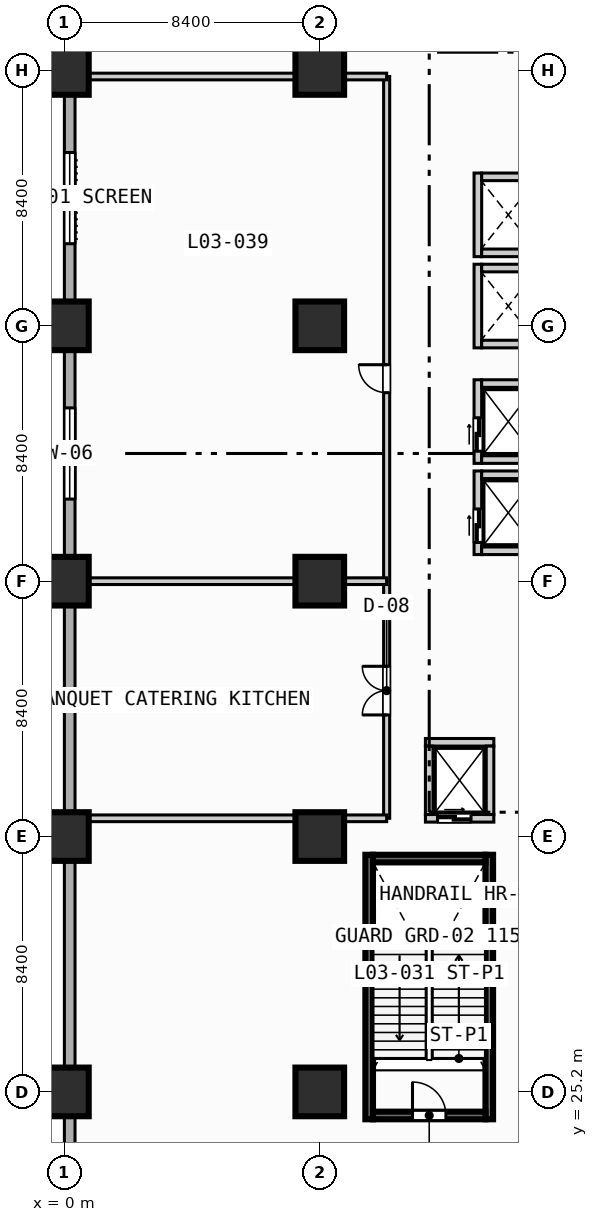
"""IFC4 building model, lengths in metres.
Left out: names, types, materials, properties, quantities, classifications, styles, units other than length and angle.
Written with IfcOpenShell. Run it as: python <this file> out.ifc"""

import sys

from ifc_helpers import new_model, si_unit, direction, frame, frame_2d, origin, origin_2d, place, context, subcontext, project, spatial, rectangle, extrude, element, fill, save


model = new_model("IFC4")
c1 = context("Model", 3, precision=1e-05, world=origin(), true_north=direction((0.0, 1.0)))
c2 = subcontext(c1, "Body", "Model", "MODEL_VIEW")
j1 = project(units=[si_unit("LENGTHUNIT", "METRE"), si_unit("PLANEANGLEUNIT", "RADIAN")], contexts=[c1])
p1 = place(None, origin())
s1 = spatial("IfcSite", under=j1, at=p1, CompositionType="ELEMENT")
p2 = place(p1, origin())
s2 = spatial("IfcBuilding", under=s1, at=p2, CompositionType="ELEMENT")
p3 = place(p2, frame((0.0, 0.0, 15.6)))
s3 = spatial("IfcBuildingStorey", under=s2, at=p3, CompositionType="ELEMENT", Elevation=15.6)
for number, where, z_axis, x_axis in (
    (1, (10.025, 24.3, 0.0), (0.0, 0.0, 1.0), (0.0, 1.0, 0.0)),
    (2, (13.975, 24.3, 0.0), (0.0, 0.0, 1.0), (0.0, 1.0, 0.0)),
):
    element("IfcWall", number, at=place(p3, frame(where, z_axis=z_axis, x_axis=x_axis)), inside=s3, PredefinedType="SOLIDWALL", context=c2, shape_type="SweptSolid", body=[
        extrude(rectangle(XDim=8.7, YDim=0.25, at=frame_2d((4.35, 0.0))), origin(), (0.0, 0.0, 1.0), 4.85),
    ])
p4 = place(p3, frame((10.15, 32.875, 0.0), z_axis=(0.0, 0.0, 1.0), x_axis=(1.0, 0.0, 0.0)))
e3 = element("IfcWall", 3, at=p4, inside=s3, PredefinedType="SOLIDWALL", context=c2, shape_type="SweptSolid", body=[
    extrude(rectangle(XDim=3.7, YDim=0.25, at=frame_2d((1.85, 0.0))), origin(), (0.0, 0.0, 1.0), 4.85),
])
for number, where, z_axis, x_axis in (
    (4, (0.0, 25.2, 0.0), (0.0, 0.0, 1.0), (1.0, 0.0, 0.0)),
    (5, (0.0, 33.6, 0.0), (0.0, 0.0, 1.0), (1.0, 0.0, 0.0)),
    (6, (0.0, 42.0, 0.0), (0.0, 0.0, 1.0), (1.0, 0.0, 0.0)),
    (7, (0.0, 50.4, 0.0), (0.0, 0.0, 1.0), (1.0, 0.0, 0.0)),
    (8, (0.0, 58.8, 0.0), (0.0, 0.0, 1.0), (1.0, 0.0, 0.0)),
    (9, (8.4, 25.2, 0.0), (0.0, 0.0, 1.0), (1.0, 0.0, 0.0)),
    (10, (8.4, 33.6, 0.0), (0.0, 0.0, 1.0), (1.0, 0.0, 0.0)),
    (11, (8.4, 42.0, 0.0), (0.0, 0.0, 1.0), (1.0, 0.0, 0.0)),
    (12, (8.4, 50.4, 0.0), (0.0, 0.0, 1.0), (1.0, 0.0, 0.0)),
    (13, (8.4, 58.8, 0.0), (0.0, 0.0, 1.0), (1.0, 0.0, 0.0)),
):
    element("IfcColumn", number, at=place(p3, frame(where, z_axis=z_axis, x_axis=x_axis)), inside=s3, PredefinedType="COLUMN", context=c2, shape_type="SweptSolid", body=[
        extrude(rectangle(XDim=1.6, YDim=1.6, at=origin_2d()), origin(), (0.0, 0.0, 1.0), 5.2),
    ])
p5 = place(p3, frame((0.175, 3.175, 0.0), z_axis=(0.0, 0.0, 1.0), x_axis=(0.0, 1.0, 0.0)))
e14 = element("IfcWall", 14, at=p5, inside=s3, PredefinedType="STANDARD", context=c2, shape_type="SweptSolid", body=[
    extrude(rectangle(XDim=86.05, YDim=0.35, at=frame_2d((43.025, 0.0))), origin(), (0.0, 0.0, 1.0), 4.85),
])
p6 = place(p5, frame((41.525, 0.0, 0.85)))
e15 = element("IfcOpeningElement", 15, at=p6, cuts=e14, PredefinedType="OPENING", context=c2, shape_type="SweptSolid", body=[
    extrude(rectangle(XDim=3.0, YDim=2.4, at=frame_2d((1.5, 1.2))), frame((0.0, 0.185, 0.0), z_axis=(0.0, -1.0, 0.0), x_axis=(1.0, 0.0, 0.0)), (0.0, 0.0, 1.0), 0.37),
])
p7 = place(p5, frame((49.925, 0.0, 0.85)))
e16 = element("IfcOpeningElement", 16, at=p7, cuts=e14, PredefinedType="OPENING", context=c2, shape_type="SweptSolid", body=[
    extrude(rectangle(XDim=3.0, YDim=2.4, at=frame_2d((1.5, 1.2))), frame((0.0, 0.185, 0.0), z_axis=(0.0, -1.0, 0.0), x_axis=(1.0, 0.0, 0.0)), (0.0, 0.0, 1.0), 0.37),
])
p8 = place(p3, frame((11.875, 34.2, 0.0), z_axis=(0.0, 0.0, 1.0), x_axis=(1.0, 0.0, 0.0)))
e17 = element("IfcWall", 17, at=p8, inside=s3, PredefinedType="SOLIDWALL", context=c2, shape_type="SweptSolid", body=[
    extrude(rectangle(XDim=2.25, YDim=0.25, at=frame_2d((1.125, 0.0))), origin(), (0.0, 0.0, 1.0), 4.85),
])
p9 = place(p8, frame((0.4, 0.0, 0.0)))
e18 = element("IfcOpeningElement", 18, at=p9, cuts=e17, PredefinedType="OPENING", context=c2, shape_type="SweptSolid", body=[
    extrude(rectangle(XDim=1.1, YDim=2.15, at=frame_2d((0.55, 1.075))), frame((0.0, 0.135, 0.0), z_axis=(0.0, -1.0, 0.0), x_axis=(1.0, 0.0, 0.0)), (0.0, 0.0, 1.0), 0.27),
])
for number, where, z_axis, x_axis in (
    (19, (11.875, 36.7, 0.0), (0.0, 0.0, 1.0), (1.0, 0.0, 0.0)),
    (20, (12.0, 34.325, 0.0), (0.0, 0.0, 1.0), (0.0, 1.0, 0.0)),
    (21, (14.0, 34.325, 0.0), (0.0, 0.0, 1.0), (0.0, 1.0, 0.0)),
):
    element("IfcWall", number, at=place(p3, frame(where, z_axis=z_axis, x_axis=x_axis)), inside=s3, PredefinedType="SOLIDWALL", context=c2, shape_type="SweptSolid", body=[
        extrude(rectangle(XDim=2.25, YDim=0.25, at=frame_2d((1.125, 0.0))), origin(), (0.0, 0.0, 1.0), 4.85),
    ])
p10 = place(p3, frame((13.6, 42.875, 0.0), z_axis=(0.0, 0.0, 1.0), x_axis=(0.0, 1.0, 0.0)))
e22 = element("IfcWall", 22, at=p10, inside=s3, PredefinedType="SOLIDWALL", context=c2, shape_type="SweptSolid", body=[
    extrude(rectangle(XDim=2.75, YDim=0.25, at=frame_2d((1.375, 0.0))), origin(), (0.0, 0.0, 1.0), 4.85),
])
p11 = place(p10, frame((0.4, 0.0, 0.0)))
e23 = element("IfcOpeningElement", 23, at=p11, cuts=e22, PredefinedType="OPENING", context=c2, shape_type="SweptSolid", body=[
    extrude(rectangle(XDim=1.1, YDim=2.15, at=frame_2d((0.55, 1.075))), frame((0.0, 0.135, 0.0), z_axis=(0.0, -1.0, 0.0), x_axis=(1.0, 0.0, 0.0)), (0.0, 0.0, 1.0), 0.27),
])
for number, where, z_axis, x_axis in (
    (24, (13.725, 43.0, 0.0), (0.0, 0.0, 1.0), (1.0, 0.0, 0.0)),
    (25, (13.725, 45.5, 0.0), (0.0, 0.0, 1.0), (1.0, 0.0, 0.0)),
):
    element("IfcWall", number, at=place(p3, frame(where, z_axis=z_axis, x_axis=x_axis)), inside=s3, PredefinedType="SOLIDWALL", context=c2, shape_type="SweptSolid", body=[
        extrude(rectangle(XDim=1.75, YDim=0.25, at=frame_2d((0.875, 0.0))), origin(), (0.0, 0.0, 1.0), 4.85),
    ])
p12 = place(p3, frame((13.6, 45.875, 0.0), z_axis=(0.0, 0.0, 1.0), x_axis=(0.0, 1.0, 0.0)))
e26 = element("IfcWall", 26, at=p12, inside=s3, PredefinedType="SOLIDWALL", context=c2, shape_type="SweptSolid", body=[
    extrude(rectangle(XDim=2.75, YDim=0.25, at=frame_2d((1.375, 0.0))), origin(), (0.0, 0.0, 1.0), 4.85),
])
p13 = place(p12, frame((0.4, 0.0, 0.0)))
e27 = element("IfcOpeningElement", 27, at=p13, cuts=e26, PredefinedType="OPENING", context=c2, shape_type="SweptSolid", body=[
    extrude(rectangle(XDim=1.1, YDim=2.15, at=frame_2d((0.55, 1.075))), frame((0.0, 0.135, 0.0), z_axis=(0.0, -1.0, 0.0), x_axis=(1.0, 0.0, 0.0)), (0.0, 0.0, 1.0), 0.27),
])
for number, where, z_axis, x_axis in (
    (28, (13.725, 46.0, 0.0), (0.0, 0.0, 1.0), (1.0, 0.0, 0.0)),
    (29, (13.725, 48.5, 0.0), (0.0, 0.0, 1.0), (1.0, 0.0, 0.0)),
):
    element("IfcWall", number, at=place(p3, frame(where, z_axis=z_axis, x_axis=x_axis)), inside=s3, PredefinedType="SOLIDWALL", context=c2, shape_type="SweptSolid", body=[
        extrude(rectangle(XDim=1.75, YDim=0.25, at=frame_2d((0.875, 0.0))), origin(), (0.0, 0.0, 1.0), 4.85),
    ])
p14 = place(p3, frame((13.6, 49.675, 0.0), z_axis=(0.0, 0.0, 1.0), x_axis=(0.0, 1.0, 0.0)))
e30 = element("IfcWall", 30, at=p14, inside=s3, PredefinedType="SOLIDWALL", context=c2, shape_type="SweptSolid", body=[
    extrude(rectangle(XDim=2.75, YDim=0.25, at=frame_2d((1.375, 0.0))), origin(), (0.0, 0.0, 1.0), 4.85),
])
for number, where, z_axis, x_axis in (
    (31, (13.725, 49.8, 0.0), (0.0, 0.0, 1.0), (1.0, 0.0, 0.0)),
    (32, (13.725, 52.3, 0.0), (0.0, 0.0, 1.0), (1.0, 0.0, 0.0)),
):
    element("IfcWall", number, at=place(p3, frame(where, z_axis=z_axis, x_axis=x_axis)), inside=s3, PredefinedType="SOLIDWALL", context=c2, shape_type="SweptSolid", body=[
        extrude(rectangle(XDim=1.75, YDim=0.25, at=frame_2d((0.875, 0.0))), origin(), (0.0, 0.0, 1.0), 4.85),
    ])
p15 = place(p3, frame((13.6, 52.675, 0.0), z_axis=(0.0, 0.0, 1.0), x_axis=(0.0, 1.0, 0.0)))
e33 = element("IfcWall", 33, at=p15, inside=s3, PredefinedType="SOLIDWALL", context=c2, shape_type="SweptSolid", body=[
    extrude(rectangle(XDim=2.75, YDim=0.25, at=frame_2d((1.375, 0.0))), origin(), (0.0, 0.0, 1.0), 4.85),
])
for number, where, z_axis, x_axis in (
    (34, (13.725, 52.8, 0.0), (0.0, 0.0, 1.0), (1.0, 0.0, 0.0)),
    (35, (13.725, 55.3, 0.0), (0.0, 0.0, 1.0), (1.0, 0.0, 0.0)),
):
    element("IfcWall", number, at=place(p3, frame(where, z_axis=z_axis, x_axis=x_axis)), inside=s3, PredefinedType="SOLIDWALL", context=c2, shape_type="SweptSolid", body=[
        extrude(rectangle(XDim=1.75, YDim=0.25, at=frame_2d((0.875, 0.0))), origin(), (0.0, 0.0, 1.0), 4.85),
    ])
p16 = place(p3, frame((10.15, 24.425, 0.0), z_axis=(0.0, 0.0, 1.0), x_axis=(1.0, 0.0, 0.0)))
e36 = element("IfcWall", 36, at=p16, inside=s3, PredefinedType="SOLIDWALL", context=c2, shape_type="SweptSolid", body=[
    extrude(rectangle(XDim=3.7, YDim=0.25, at=frame_2d((1.85, 0.0))), origin(), (0.0, 0.0, 1.0), 4.85),
])
p17 = place(p16, frame((1.3, 0.0, 0.0)))
e37 = element("IfcOpeningElement", 37, at=p17, cuts=e36, PredefinedType="OPENING", context=c2, shape_type="SweptSolid", body=[
    extrude(rectangle(XDim=1.1, YDim=2.15, at=frame_2d((0.55, 1.075))), frame((0.0, 0.135, 0.0), z_axis=(0.0, -1.0, 0.0), x_axis=(1.0, 0.0, 0.0)), (0.0, 0.0, 1.0), 0.27),
])
p18 = place(p3, frame((10.6, 34.2, 0.0), z_axis=(0.0, 0.0, 1.0), x_axis=(0.0, 1.0, 0.0)))
e38 = element("IfcWall", 38, at=p18, inside=s3, PredefinedType="PARTITIONING", context=c2, shape_type="SweptSolid", body=[
    extrude(rectangle(XDim=24.4, YDim=0.2, at=frame_2d((12.2, 0.0))), origin(), (0.0, 0.0, 1.0), 4.85),
])
p19 = place(p18, frame((3.4, 0.0, 0.0)))
e39 = element("IfcOpeningElement", 39, at=p19, cuts=e38, PredefinedType="OPENING", context=c2, shape_type="SweptSolid", body=[
    extrude(rectangle(XDim=1.6, YDim=2.2, at=frame_2d((0.8, 1.1))), frame((0.0, 0.11, 0.0), z_axis=(0.0, -1.0, 0.0), x_axis=(1.0, 0.0, 0.0)), (0.0, 0.0, 1.0), 0.22),
])
p20 = place(p18, frame((14.0, 0.0, 0.0)))
e40 = element("IfcOpeningElement", 40, at=p20, cuts=e38, PredefinedType="OPENING", context=c2, shape_type="SweptSolid", body=[
    extrude(rectangle(XDim=0.92, YDim=2.1, at=frame_2d((0.46, 1.05))), frame((0.0, 0.11, 0.0), z_axis=(0.0, -1.0, 0.0), x_axis=(1.0, 0.0, 0.0)), (0.0, 0.0, 1.0), 0.22),
])
p21 = place(p3, frame((0.35, 34.2, 0.0), z_axis=(0.0, 0.0, 1.0), x_axis=(1.0, 0.0, 0.0)))
e41 = element("IfcWall", 41, at=p21, inside=s3, PredefinedType="PARTITIONING", context=c2, shape_type="SweptSolid", body=[
    extrude(rectangle(XDim=10.25, YDim=0.22, at=frame_2d((5.125, 0.0))), origin(), (0.0, 0.0, 1.0), 4.85),
])
for number, where, z_axis, x_axis in (
    (42, (0.35, 42.0, 0.0), (0.0, 0.0, 1.0), (1.0, 0.0, 0.0)),
    (43, (0.35, 58.6, 0.0), (0.0, 0.0, 1.0), (1.0, 0.0, 0.0)),
):
    element("IfcWall", number, at=place(p3, frame(where, z_axis=z_axis, x_axis=x_axis)), inside=s3, PredefinedType="PARTITIONING", context=c2, shape_type="SweptSolid", body=[
        extrude(rectangle(XDim=10.25, YDim=0.22, at=frame_2d((5.125, 0.0))), origin(), (0.0, 0.0, 1.0), 4.0),
    ])
p22 = place(p6, origin())
e44 = element("IfcWindow", 44, at=p22, inside=s3, PartitioningType="SINGLE_PANEL", PredefinedType="WINDOW", context=c2, shape_type="SweptSolid", body=[
    extrude(rectangle(XDim=3.0, YDim=2.4, at=frame_2d((1.5, 1.2))), frame((0.0, 0.03, 0.0), z_axis=(0.0, -1.0, 0.0), x_axis=(1.0, 0.0, 0.0)), (0.0, 0.0, 1.0), 0.06),
])
fill(e15, e44)
p23 = place(p7, origin())
e45 = element("IfcWindow", 45, at=p23, inside=s3, PartitioningType="SINGLE_PANEL", PredefinedType="WINDOW", context=c2, shape_type="SweptSolid", body=[
    extrude(rectangle(XDim=3.0, YDim=2.4, at=frame_2d((1.5, 1.2))), frame((0.0, 0.03, 0.0), z_axis=(0.0, -1.0, 0.0), x_axis=(1.0, 0.0, 0.0)), (0.0, 0.0, 1.0), 0.06),
])
fill(e16, e45)
p24 = place(p9, origin())
e46 = element("IfcDoor", 46, at=p24, inside=s3, OperationType="SLIDING_TO_LEFT", PredefinedType="DOOR", context=c2, shape_type="SweptSolid", body=[
    extrude(rectangle(XDim=1.1, YDim=2.15, at=frame_2d((0.55, 1.075))), frame((0.0, 0.025, 0.0), z_axis=(0.0, -1.0, 0.0), x_axis=(1.0, 0.0, 0.0)), (0.0, 0.0, 1.0), 0.05),
])
fill(e18, e46)
p25 = place(p11, origin())
e47 = element("IfcDoor", 47, at=p25, inside=s3, OperationType="SLIDING_TO_LEFT", PredefinedType="DOOR", context=c2, shape_type="SweptSolid", body=[
    extrude(rectangle(XDim=1.1, YDim=2.15, at=frame_2d((0.55, 1.075))), frame((0.0, 0.025, 0.0), z_axis=(0.0, -1.0, 0.0), x_axis=(1.0, 0.0, 0.0)), (0.0, 0.0, 1.0), 0.05),
])
fill(e23, e47)
p26 = place(p13, origin())
e48 = element("IfcDoor", 48, at=p26, inside=s3, OperationType="SLIDING_TO_LEFT", PredefinedType="DOOR", context=c2, shape_type="SweptSolid", body=[
    extrude(rectangle(XDim=1.1, YDim=2.15, at=frame_2d((0.55, 1.075))), frame((0.0, 0.025, 0.0), z_axis=(0.0, -1.0, 0.0), x_axis=(1.0, 0.0, 0.0)), (0.0, 0.0, 1.0), 0.05),
])
fill(e27, e48)
p27 = place(p17, origin())
e49 = element("IfcDoor", 49, at=p27, inside=s3, OperationType="SINGLE_SWING_LEFT", PredefinedType="DOOR", context=c2, shape_type="SweptSolid", body=[
    extrude(rectangle(XDim=1.1, YDim=2.15, at=frame_2d((0.55, 1.075))), frame((0.0, 0.025, 0.0), z_axis=(0.0, -1.0, 0.0), x_axis=(1.0, 0.0, 0.0)), (0.0, 0.0, 1.0), 0.05),
])
fill(e37, e49)
p28 = place(p19, origin())
e50 = element("IfcDoor", 50, at=p28, inside=s3, OperationType="SINGLE_SWING_LEFT", PredefinedType="DOOR", context=c2, shape_type="SweptSolid", body=[
    extrude(rectangle(XDim=1.6, YDim=2.2, at=frame_2d((0.8, 1.1))), frame((0.0, 0.025, 0.0), z_axis=(0.0, -1.0, 0.0), x_axis=(1.0, 0.0, 0.0)), (0.0, 0.0, 1.0), 0.05),
])
fill(e39, e50)
p29 = place(p20, origin())
e51 = element("IfcDoor", 51, at=p29, inside=s3, OperationType="SINGLE_SWING_RIGHT", PredefinedType="DOOR", context=c2, shape_type="SweptSolid", body=[
    extrude(rectangle(XDim=0.92, YDim=2.1, at=frame_2d((0.46, 1.05))), frame((0.0, 0.025, 0.0), z_axis=(0.0, -1.0, 0.0), x_axis=(1.0, 0.0, 0.0)), (0.0, 0.0, 1.0), 0.05),
])
fill(e40, e51)
save(model, sys.argv[1])
